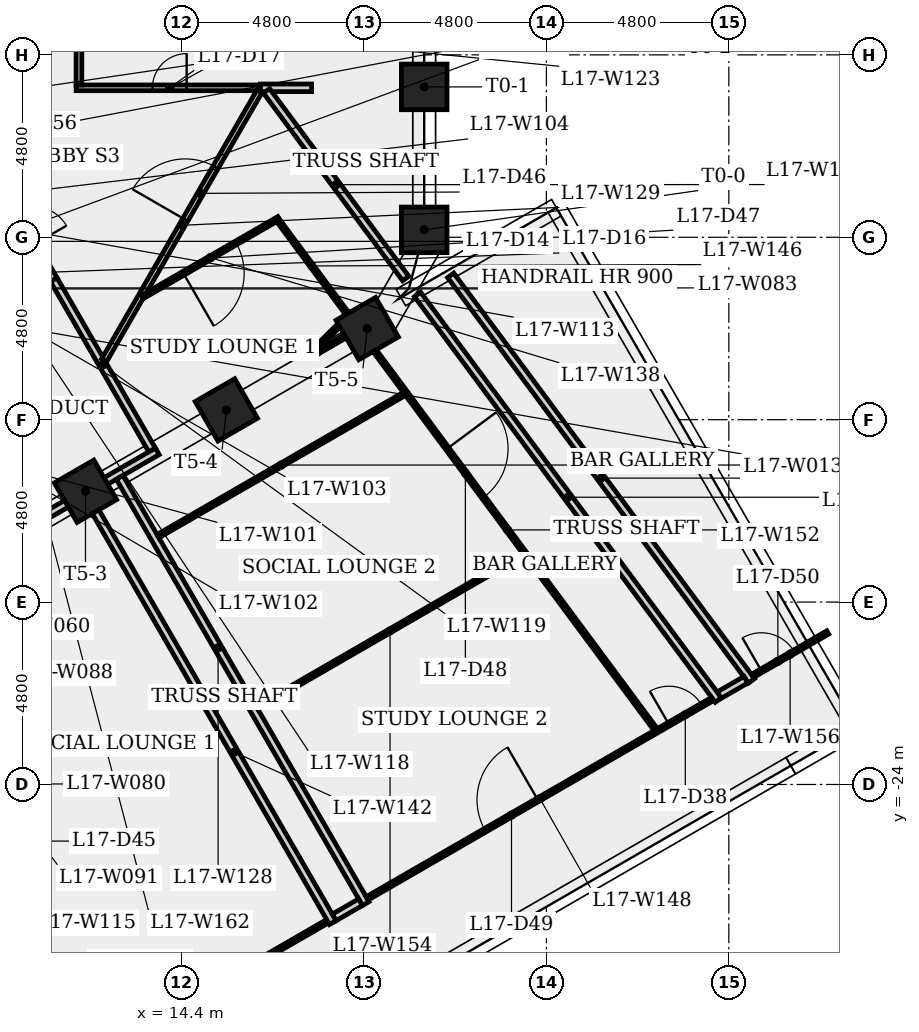
"""IFC4 building model, lengths in metres.
Left out: names, types, materials, properties, quantities, classifications, styles, units other than length and angle.
Written with IfcOpenShell. Run it as: python <this file> out.ifc"""

import sys

from ifc_helpers import new_model, si_unit, direction, frame, frame_2d, origin, origin_2d, place, context, subcontext, project, spatial, rectangle, extrude, element, fill, save


model = new_model("IFC4")
c1 = context("Model", 3, precision=1e-05, world=origin(), true_north=direction((0.0, 1.0)))
c2 = subcontext(c1, "Body", "Model", "MODEL_VIEW")
j1 = project(units=[si_unit("LENGTHUNIT", "METRE"), si_unit("PLANEANGLEUNIT", "RADIAN")], contexts=[c1])
p1 = place(None, origin())
s1 = spatial("IfcSite", under=j1, at=p1, CompositionType="ELEMENT")
p2 = place(p1, origin())
s2 = spatial("IfcBuilding", under=s1, at=p2, CompositionType="ELEMENT")
p3 = place(p2, frame((0.0, 0.0, 66.3)))
s3 = spatial("IfcBuildingStorey", under=s2, at=p3, CompositionType="ELEMENT", Elevation=66.3)
for number, where, z_axis, x_axis in (
    (1, (20.785, -9.405, 0.0), (0.0, 0.0, 1.0), (1.0, 0.0, 0.0)),
    (2, (20.785, -5.643, 0.0), (0.0, 0.0, 1.0), (1.0, 0.0, 0.0)),
    (3, (11.872, -16.283, 0.0), (0.0, 0.0, 1.0), (0.5, -0.866, 0.0)),
    (4, (15.578, -14.143, 0.0), (0.0, 0.0, 1.0), (0.5, -0.866, 0.0)),
    (5, (19.285, -12.003, 0.0), (0.0, 0.0, 1.0), (0.5, -0.866, 0.0)),
):
    element("IfcColumn", number, at=place(p3, frame(where, z_axis=z_axis, x_axis=x_axis)), inside=s3, PredefinedType="COLUMN", context=c2, shape_type="SweptSolid", body=[
        extrude(rectangle(XDim=1.2, YDim=1.2, at=origin_2d()), origin(), (0.0, 0.0, 1.0), 4.0),
    ])
p4 = place(p3, frame((5.561, -19.831, 0.0), z_axis=(0.0, 0.0, 1.0), x_axis=(0.500009798456, -0.866019746569, 0.0)))
e6 = element("IfcWall", 6, at=p4, inside=s3, PredefinedType="PARTITIONING", context=c2, shape_type="SweptSolid", body=[
    extrude(rectangle(XDim=13.018, YDim=0.1, at=frame_2d((6.509, 0.0))), origin(), (0.0, 0.0, 1.0), 3.6),
])
p5 = place(p4, frame((5.734, 0.0, 0.0)))
e7 = element("IfcOpeningElement", 7, at=p5, cuts=e6, PredefinedType="OPENING", context=c2, shape_type="SweptSolid", body=[
    extrude(rectangle(XDim=1.6, YDim=2.1, at=frame_2d((0.8, 1.05))), frame((0.0, 0.06, 0.0), z_axis=(0.0, -1.0, 0.0), x_axis=(1.0, 0.0, 0.0)), (0.0, 0.0, 1.0), 0.12),
])
p6 = place(p3, frame((9.537, -8.119, 0.0), z_axis=(0.0, 0.0, 1.0), x_axis=(0.499990139034, -0.866031096941, 0.0)))
e8 = element("IfcWall", 8, at=p6, inside=s3, PredefinedType="PARTITIONING", context=c2, shape_type="SweptSolid", body=[
    extrude(rectangle(XDim=3.0, YDim=0.2, at=frame_2d((1.5, 0.0))), origin(), (0.0, 0.0, 1.0), 3.6),
])
p7 = place(p6, frame((0.935, 0.0, 0.0)))
e9 = element("IfcOpeningElement", 9, at=p7, cuts=e8, PredefinedType="OPENING", context=c2, shape_type="SweptSolid", body=[
    extrude(rectangle(XDim=1.0, YDim=2.1, at=frame_2d((0.5, 1.05))), frame((0.0, 0.11, 0.0), z_axis=(0.0, -1.0, 0.0), x_axis=(1.0, 0.0, 0.0)), (0.0, 0.0, 1.0), 0.22),
])
p8 = place(p3, frame((5.966, -19.733, 0.0), z_axis=(0.0, 0.0, 1.0), x_axis=(0.866024315419, 0.5000018851, 0.0)))
e10 = element("IfcWall", 10, at=p8, inside=s3, PredefinedType="PLUMBINGWALL", context=c2, shape_type="SweptSolid", body=[
    extrude(rectangle(XDim=9.0, YDim=0.2, at=frame_2d((4.5, 0.0))), origin(), (0.0, 0.0, 1.0), 2.675),
])
p9 = place(p3, frame((10.622, -31.998, 0.0), z_axis=(0.0, 0.0, 1.0), x_axis=(0.866020190133, 0.500009030201, 0.0)))
e11 = element("IfcWall", 11, at=p9, inside=s3, PredefinedType="PARTITIONING", context=c2, shape_type="SweptSolid", body=[
    extrude(rectangle(XDim=8.8, YDim=0.1, at=frame_2d((4.4, 0.0))), origin(), (0.0, 0.0, 1.0), 3.6),
])
p10 = place(p3, frame((11.037, -10.717, 0.0), z_axis=(0.0, 0.0, 1.0), x_axis=(0.500012553759, -0.866018155747, 0.0)))
e12 = element("IfcWall", 12, at=p10, inside=s3, PredefinedType="PLUMBINGWALL", context=c2, shape_type="SweptSolid", body=[
    extrude(rectangle(XDim=5.172, YDim=0.2, at=frame_2d((2.586, 0.0))), origin(), (0.0, 0.0, 1.0), 3.6),
])
p11 = place(p3, frame((11.625, -5.667, 0.0), z_axis=(0.0, 0.0, 1.0), x_axis=(1.0, 0.0, 0.0)))
e13 = element("IfcWall", 13, at=p11, inside=s3, PredefinedType="PARTITIONING", context=c2, shape_type="SweptSolid", body=[
    extrude(rectangle(XDim=4.952, YDim=0.15, at=frame_2d((2.476, 0.0))), origin(), (0.0, 0.0, 1.0), 3.6),
])
p12 = place(p11, frame((2.009, 0.0, 0.0)))
e14 = element("IfcOpeningElement", 14, at=p12, cuts=e13, PredefinedType="OPENING", context=c2, shape_type="SweptSolid", body=[
    extrude(rectangle(XDim=0.9, YDim=2.1, at=frame_2d((0.45, 1.05))), frame((0.0, 0.085, 0.0), z_axis=(0.0, -1.0, 0.0), x_axis=(1.0, 0.0, 0.0)), (0.0, 0.0, 1.0), 0.17),
])
p13 = place(p3, frame((11.7, -5.592, 0.0), z_axis=(0.0, 0.0, 1.0), x_axis=(0.0, 1.0, 0.0)))
e15 = element("IfcWall", 15, at=p13, inside=s3, PredefinedType="PARTITIONING", context=c2, shape_type="SweptSolid", body=[
    extrude(rectangle(XDim=10.835, YDim=0.15, at=frame_2d((5.417, 0.0))), origin(), (0.0, 0.0, 1.0), 3.6),
])
p14 = place(p13, frame((6.181, 0.0, 0.0)))
e16 = element("IfcOpeningElement", 16, at=p14, cuts=e15, PredefinedType="OPENING", context=c2, shape_type="SweptSolid", body=[
    extrude(rectangle(XDim=0.9, YDim=2.1, at=frame_2d((0.45, 1.05))), frame((0.0, 0.085, 0.0), z_axis=(0.0, -1.0, 0.0), x_axis=(1.0, 0.0, 0.0)), (0.0, 0.0, 1.0), 0.17),
])
p15 = place(p3, frame((12.771, -15.92, 0.0), z_axis=(0.0, 0.0, 1.0), x_axis=(0.499989546451, -0.86603143906, 0.0)))
e17 = element("IfcWall", 17, at=p15, inside=s3, PredefinedType="PLUMBINGWALL", context=c2, shape_type="SweptSolid", body=[
    extrude(rectangle(XDim=12.95, YDim=0.2, at=frame_2d((6.475, 0.0))), origin(), (0.0, 0.0, 1.0), 3.6),
])
p16 = place(p3, frame((12.362, -12.838, 0.0), z_axis=(0.0, 0.0, 1.0), x_axis=(0.500004918852, 0.866022563865, 0.0)))
e18 = element("IfcWall", 18, at=p16, inside=s3, PredefinedType="PARTITIONING", context=c2, shape_type="SweptSolid", body=[
    extrude(rectangle(XDim=8.205, YDim=0.15, at=frame_2d((4.103, 0.0))), origin(), (0.0, 0.0, 1.0), 3.6),
])
p17 = place(p16, frame((4.273, 0.0, 0.0)))
e19 = element("IfcOpeningElement", 19, at=p17, cuts=e18, PredefinedType="OPENING", context=c2, shape_type="SweptSolid", body=[
    extrude(rectangle(XDim=1.6, YDim=2.1, at=frame_2d((0.8, 1.05))), frame((0.0, 0.085, 0.0), z_axis=(0.0, -1.0, 0.0), x_axis=(1.0, 0.0, 0.0)), (0.0, 0.0, 1.0), 0.17),
])
p18 = place(p3, frame((16.958, -9.099, 0.0), z_axis=(0.0, 0.0, 1.0), x_axis=(-0.866042429026, -0.499970510257, 0.0)))
e20 = element("IfcWall", 20, at=p18, inside=s3, PredefinedType="PARTITIONING", context=c2, shape_type="SweptSolid", body=[
    extrude(rectangle(XDim=4.146, YDim=0.1, at=frame_2d((2.073, 0.0))), origin(), (0.0, 0.0, 1.0), 3.6),
])
p19 = place(p18, frame((1.298, 0.0, 0.0)))
e21 = element("IfcOpeningElement", 21, at=p19, cuts=e20, PredefinedType="OPENING", context=c2, shape_type="SweptSolid", body=[
    extrude(rectangle(XDim=1.6, YDim=2.1, at=frame_2d((0.8, 1.05))), frame((0.0, 0.06, 0.0), z_axis=(0.0, -1.0, 0.0), x_axis=(1.0, 0.0, 0.0)), (0.0, 0.0, 1.0), 0.12),
])
p20 = place(p3, frame((17.822, -5.667, 0.0), z_axis=(0.0, 0.0, 1.0), x_axis=(-1.0, 0.0, 0.0)))
e22 = element("IfcWall", 22, at=p20, inside=s3, PredefinedType="PLUMBINGWALL", context=c2, shape_type="SweptSolid", body=[
    extrude(rectangle(XDim=1.345, YDim=0.2, at=frame_2d((0.673, 0.0))), origin(), (0.0, 0.0, 1.0), 3.6),
])
p21 = place(p3, frame((17.883, -12.574, 0.0), z_axis=(0.0, 0.0, 1.0), x_axis=(0.707106781187, 0.707106781187, 0.0)))
e23 = element("IfcWall", 23, at=p21, inside=s3, PredefinedType="PARTITIONING", context=c2, shape_type="SweptSolid", body=[
    extrude(rectangle(XDim=1.19, YDim=0.1, at=frame_2d((0.595, 0.0))), origin(), (0.0, 0.0, 1.0), 2.675),
])
p22 = place(p3, frame((18.013, -12.662, 0.0), z_axis=(0.0, 0.0, 1.0), x_axis=(-0.608139126224, 0.793830462476, 0.0)))
e24 = element("IfcWall", 24, at=p22, inside=s3, PredefinedType="PARTITIONING", context=c2, shape_type="SweptSolid", body=[
    extrude(rectangle(XDim=0.105, YDim=0.1, at=frame_2d((0.053, 0.0))), origin(), (0.0, 0.0, 1.0), 3.6),
])
p23 = place(p3, frame((18.38, -27.635, 0.0), z_axis=(0.0, 0.0, 1.0), x_axis=(-0.500003685891, 0.866023275724, 0.0)))
e25 = element("IfcWall", 25, at=p23, inside=s3, PredefinedType="PLUMBINGWALL", context=c2, shape_type="SweptSolid", body=[
    extrude(rectangle(XDim=12.95, YDim=0.2, at=frame_2d((6.475, 0.0))), origin(), (0.0, 0.0, 1.0), 3.6),
])
p24 = place(p3, frame((18.702, -11.72, 0.0), z_axis=(0.0, 0.0, 1.0), x_axis=(0.257902224814, 0.966171021319, 0.0)))
e26 = element("IfcWall", 26, at=p24, inside=s3, PredefinedType="PARTITIONING", context=c2, shape_type="SweptSolid", body=[
    extrude(rectangle(XDim=0.19, YDim=0.1, at=frame_2d((0.095, 0.0))), origin(), (0.0, 0.0, 1.0), 3.6),
])
p25 = place(p3, frame((18.709, -11.544, 0.0), z_axis=(0.0, 0.0, 1.0), x_axis=(-0.595692593252, 0.803212508832, 0.0)))
e27 = element("IfcWall", 27, at=p25, inside=s3, PredefinedType="PARTITIONING", context=c2, shape_type="SweptSolid", body=[
    extrude(rectangle(XDim=2.962, YDim=0.1, at=frame_2d((1.481, 0.0))), origin(), (0.0, 0.0, 1.0), 3.6),
])
p26 = place(p3, frame((19.094, -11.98, 0.0), z_axis=(0.0, 0.0, 1.0), x_axis=(-0.866030726613, -0.499990780478, 0.0)))
e28 = element("IfcWall", 28, at=p26, inside=s3, PredefinedType="PARTITIONING", context=c2, shape_type="SweptSolid", body=[
    extrude(rectangle(XDim=1.234, YDim=0.1, at=frame_2d((0.617, 0.0))), origin(), (0.0, 0.0, 1.0), 2.675),
])
p27 = place(p3, frame((19.282, -26.998, 0.0), z_axis=(0.0, 0.0, 1.0), x_axis=(0.866024561644, 0.500001458627, 0.0)))
e29 = element("IfcWall", 29, at=p27, inside=s3, PredefinedType="PARTITIONING", context=c2, shape_type="SweptSolid", body=[
    extrude(rectangle(XDim=10.503, YDim=0.1, at=frame_2d((5.252, 0.0))), origin(), (0.0, 0.0, 1.0), 3.6),
])
p28 = place(p27, frame((9.168, 0.0, 0.0)))
e30 = element("IfcOpeningElement", 30, at=p28, cuts=e29, PredefinedType="OPENING", context=c2, shape_type="SweptSolid", body=[
    extrude(rectangle(XDim=1.0, YDim=2.1, at=frame_2d((0.5, 1.05))), frame((0.0, 0.06, 0.0), z_axis=(0.0, -1.0, 0.0), x_axis=(1.0, 0.0, 0.0)), (0.0, 0.0, 1.0), 0.12),
])
p29 = place(p27, frame((3.587, 0.0, 0.0)))
e31 = element("IfcOpeningElement", 31, at=p29, cuts=e29, PredefinedType="OPENING", context=c2, shape_type="SweptSolid", body=[
    extrude(rectangle(XDim=1.6, YDim=2.1, at=frame_2d((0.8, 1.05))), frame((0.0, 0.06, 0.0), z_axis=(0.0, -1.0, 0.0), x_axis=(1.0, 0.0, 0.0)), (0.0, 0.0, 1.0), 0.12),
])
p30 = place(p3, frame((19.109, -27.098, 0.0), z_axis=(0.0, 0.0, 1.0), x_axis=(-0.866094119867, -0.499880961361, 0.0)))
e32 = element("IfcWall", 32, at=p30, inside=s3, PredefinedType="PLUMBINGWALL", context=c2, shape_type="SweptSolid", body=[
    extrude(rectangle(XDim=0.8, YDim=0.2, at=frame_2d((0.4, 0.0))), origin(), (0.0, 0.0, 1.0), 3.6),
])
p31 = place(p3, frame((20.297, -10.684, 0.0), z_axis=(0.0, 0.0, 1.0), x_axis=(-0.595739477662, 0.80317773547, 0.0)))
e33 = element("IfcWall", 33, at=p31, inside=s3, PredefinedType="PLUMBINGWALL", context=c2, shape_type="SweptSolid", body=[
    extrude(rectangle(XDim=6.146, YDim=0.2, at=frame_2d((3.073, 0.0))), origin(), (0.0, 0.0, 1.0), 3.6),
])
p32 = place(p3, frame((20.262, -13.722, 0.0), z_axis=(0.0, 0.0, 1.0), x_axis=(-0.866021041913, -0.500007554907, 0.0)))
e34 = element("IfcWall", 34, at=p32, inside=s3, PredefinedType="PARTITIONING", context=c2, shape_type="SweptSolid", body=[
    extrude(rectangle(XDim=7.487, YDim=0.1, at=frame_2d((3.743, 0.0))), origin(), (0.0, 0.0, 1.0), 3.6),
])
p33 = place(p3, frame((19.081, -12.045, 0.0), z_axis=(0.0, 0.0, 1.0), x_axis=(0.595719994052, -0.803192186644, 0.0)))
e35 = element("IfcWall", 35, at=p33, inside=s3, PredefinedType="PARTITIONING", context=c2, shape_type="SweptSolid", body=[
    extrude(rectangle(XDim=13.086, YDim=0.1, at=frame_2d((6.543, 0.0))), origin(), (0.0, 0.0, 1.0), 3.6),
])
p34 = place(p33, frame((3.878, 0.0, 0.0)))
e36 = element("IfcOpeningElement", 36, at=p34, cuts=e35, PredefinedType="OPENING", context=c2, shape_type="SweptSolid", body=[
    extrude(rectangle(XDim=1.6, YDim=2.1, at=frame_2d((0.8, 1.05))), frame((0.0, 0.06, 0.0), z_axis=(0.0, -1.0, 0.0), x_axis=(1.0, 0.0, 0.0)), (0.0, 0.0, 1.0), 0.12),
])
p35 = place(p3, frame((21.482, -10.602, 0.0), z_axis=(0.0, 0.0, 1.0), x_axis=(0.595707756501, -0.803201262975, 0.0)))
e37 = element("IfcWall", 37, at=p35, inside=s3, PredefinedType="PLUMBINGWALL", context=c2, shape_type="SweptSolid", body=[
    extrude(rectangle(XDim=13.286, YDim=0.2, at=frame_2d((6.643, 0.0))), origin(), (0.0, 0.0, 1.0), 3.6),
])
p36 = place(p3, frame((23.387, -17.935, 0.0), z_axis=(0.0, 0.0, 1.0), x_axis=(-0.866021679419, -0.500006450734, 0.0)))
e38 = element("IfcWall", 38, at=p36, inside=s3, PredefinedType="PARTITIONING", context=c2, shape_type="SweptSolid", body=[
    extrude(rectangle(XDim=8.086, YDim=0.1, at=frame_2d((4.043, 0.0))), origin(), (0.0, 0.0, 1.0), 3.6),
])
p37 = place(p3, frame((28.525, -21.777, 0.0), z_axis=(0.0, 0.0, 1.0), x_axis=(-0.595719610783, 0.803192470911, 0.0)))
e39 = element("IfcWall", 39, at=p37, inside=s3, PredefinedType="PLUMBINGWALL", context=c2, shape_type="SweptSolid", body=[
    extrude(rectangle(XDim=13.287, YDim=0.2, at=frame_2d((6.643, 0.0))), origin(), (0.0, 0.0, 1.0), 3.6),
])
p38 = place(p3, frame((29.424, -21.143, 0.0), z_axis=(0.0, 0.0, 1.0), x_axis=(0.866013071698, 0.500021359192, 0.0)))
e40 = element("IfcWall", 40, at=p38, inside=s3, PredefinedType="PARTITIONING", context=c2, shape_type="SweptSolid", body=[
    extrude(rectangle(XDim=2.286, YDim=0.1, at=frame_2d((1.143, 0.0))), origin(), (0.0, 0.0, 1.0), 3.6),
])
p39 = place(p38, frame((0.27, 0.0, 0.0)))
e41 = element("IfcOpeningElement", 41, at=p39, cuts=e40, PredefinedType="OPENING", context=c2, shape_type="SweptSolid", body=[
    extrude(rectangle(XDim=1.0, YDim=2.1, at=frame_2d((0.5, 1.05))), frame((0.0, 0.06, 0.0), z_axis=(0.0, -1.0, 0.0), x_axis=(1.0, 0.0, 0.0)), (0.0, 0.0, 1.0), 0.12),
])
p40 = place(p3, frame((29.25, -21.243, 0.0), z_axis=(0.0, 0.0, 1.0), x_axis=(-0.866205740116, -0.499687518145, 0.0)))
e42 = element("IfcWall", 42, at=p40, inside=s3, PredefinedType="PLUMBINGWALL", context=c2, shape_type="SweptSolid", body=[
    extrude(rectangle(XDim=0.807, YDim=0.2, at=frame_2d((0.403, 0.0))), origin(), (0.0, 0.0, 1.0), 3.6),
])
p41 = place(p12, origin())
e43 = element("IfcDoor", 43, at=p41, inside=s3, OperationType="SINGLE_SWING_RIGHT", PredefinedType="DOOR", context=c2, shape_type="SweptSolid", body=[
    extrude(rectangle(XDim=0.9, YDim=2.1, at=frame_2d((0.45, 1.05))), frame((0.0, 0.025, 0.0), z_axis=(0.0, -1.0, 0.0), x_axis=(1.0, 0.0, 0.0)), (0.0, 0.0, 1.0), 0.05),
])
fill(e14, e43)
p42 = place(p28, origin())
e44 = element("IfcDoor", 44, at=p42, inside=s3, OperationType="SINGLE_SWING_LEFT", PredefinedType="DOOR", context=c2, shape_type="SweptSolid", body=[
    extrude(rectangle(XDim=1.0, YDim=2.1, at=frame_2d((0.5, 1.05))), frame((0.0, 0.025, 0.0), z_axis=(0.0, -1.0, 0.0), x_axis=(1.0, 0.0, 0.0)), (0.0, 0.0, 1.0), 0.05),
])
fill(e30, e44)
p43 = place(p17, origin())
e45 = element("IfcDoor", 45, at=p43, inside=s3, OperationType="SINGLE_SWING_LEFT", PredefinedType="DOOR", context=c2, shape_type="SweptSolid", body=[
    extrude(rectangle(XDim=1.6, YDim=2.1, at=frame_2d((0.8, 1.05))), frame((0.0, 0.025, 0.0), z_axis=(0.0, -1.0, 0.0), x_axis=(1.0, 0.0, 0.0)), (0.0, 0.0, 1.0), 0.05),
])
fill(e19, e45)
p44 = place(p19, origin())
e46 = element("IfcDoor", 46, at=p44, inside=s3, OperationType="SINGLE_SWING_RIGHT", PredefinedType="DOOR", context=c2, shape_type="SweptSolid", body=[
    extrude(rectangle(XDim=1.6, YDim=2.1, at=frame_2d((0.8, 1.05))), frame((0.0, 0.025, 0.0), z_axis=(0.0, -1.0, 0.0), x_axis=(1.0, 0.0, 0.0)), (0.0, 0.0, 1.0), 0.05),
])
fill(e21, e46)
p45 = place(p34, origin())
e47 = element("IfcDoor", 47, at=p45, inside=s3, OperationType="SINGLE_SWING_LEFT", PredefinedType="DOOR", context=c2, shape_type="SweptSolid", body=[
    extrude(rectangle(XDim=1.6, YDim=2.1, at=frame_2d((0.8, 1.05))), frame((0.0, 0.025, 0.0), z_axis=(0.0, -1.0, 0.0), x_axis=(1.0, 0.0, 0.0)), (0.0, 0.0, 1.0), 0.05),
])
fill(e36, e47)
p46 = place(p29, origin())
e48 = element("IfcDoor", 48, at=p46, inside=s3, OperationType="SINGLE_SWING_RIGHT", PredefinedType="DOOR", context=c2, shape_type="SweptSolid", body=[
    extrude(rectangle(XDim=1.6, YDim=2.1, at=frame_2d((0.8, 1.05))), frame((0.0, 0.025, 0.0), z_axis=(0.0, -1.0, 0.0), x_axis=(1.0, 0.0, 0.0)), (0.0, 0.0, 1.0), 0.05),
])
fill(e31, e48)
p47 = place(p39, origin())
e49 = element("IfcDoor", 49, at=p47, inside=s3, OperationType="SINGLE_SWING_LEFT", PredefinedType="DOOR", context=c2, shape_type="SweptSolid", body=[
    extrude(rectangle(XDim=1.0, YDim=2.1, at=frame_2d((0.5, 1.05))), frame((0.0, 0.025, 0.0), z_axis=(0.0, -1.0, 0.0), x_axis=(1.0, 0.0, 0.0)), (0.0, 0.0, 1.0), 0.05),
])
fill(e41, e49)
save(model, sys.argv[1])
